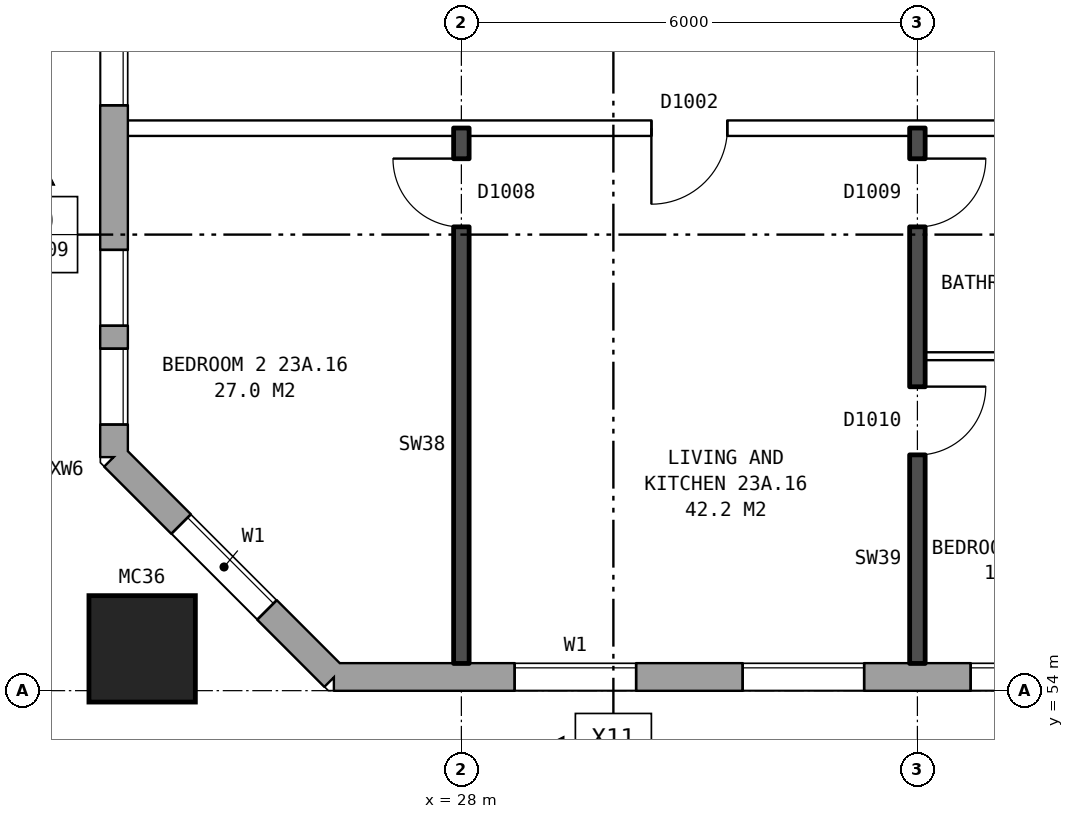
"""IFC4 building model, lengths in metres.
Left out: names, types, materials, properties, quantities, classifications, styles, units other than length and angle.
Written with IfcOpenShell. Run it as: python <this file> out.ifc"""

import sys

from ifc_helpers import new_model, si_unit, direction, frame, frame_2d, origin, origin_2d, place, context, subcontext, project, spatial, rectangle, hollow_rectangle, extrude, element, fill, save


model = new_model("IFC4")
c1 = context("Model", 3, precision=1e-05, world=origin(), true_north=direction((0.0, 1.0)))
c2 = subcontext(c1, "Body", "Model", "MODEL_VIEW")
j1 = project(units=[si_unit("LENGTHUNIT", "METRE"), si_unit("PLANEANGLEUNIT", "RADIAN")], contexts=[c1])
p1 = place(None, origin())
s1 = spatial("IfcSite", under=j1, at=p1, CompositionType="ELEMENT")
p2 = place(p1, origin())
s2 = spatial("IfcBuilding", under=s1, at=p2, CompositionType="ELEMENT")
p3 = place(p2, frame((0.0, 0.0, 84.0)))
s3 = spatial("IfcBuildingStorey", under=s2, at=p3, CompositionType="ELEMENT", Elevation=84.0)
p4 = place(p3, frame((23.8, 54.55, 0.0), z_axis=(0.0, 0.0, 1.0), x_axis=(1.0, 0.0, 0.0)))
e1 = element("IfcColumn", 1, at=p4, inside=s3, PredefinedType="COLUMN", context=c2, shape_type="SweptSolid", body=[
    extrude(hollow_rectangle(XDim=1.4, YDim=1.4, WallThickness=0.075, at=origin_2d()), origin(), (0.0, 0.0, 1.0), 3.1),
])
p5 = place(p3, frame((23.43, 57.075, 0.0), z_axis=(0.0, 0.0, 1.0), x_axis=(0.707106781187, -0.707106781187, 0.0)))
e2 = element("IfcWall", 2, at=p5, inside=s3, PredefinedType="STANDARD", context=c2, shape_type="SweptSolid", body=[
    extrude(rectangle(XDim=4.094, YDim=0.36, at=frame_2d((2.047, 0.0))), origin(), (0.0, 0.0, 1.0), 2.85),
])
p6 = place(p5, frame((1.247, 0.0, 0.8)))
e3 = element("IfcOpeningElement", 3, at=p6, cuts=e2, PredefinedType="OPENING", context=c2, shape_type="SweptSolid", body=[
    extrude(rectangle(XDim=1.6, YDim=1.8, at=frame_2d((0.8, 0.9))), frame((0.0, 0.19, 0.0), z_axis=(0.0, -1.0, 0.0), x_axis=(1.0, 0.0, 0.0)), (0.0, 0.0, 1.0), 0.38),
])
p7 = place(p3, frame((26.325, 54.18, 0.0), z_axis=(0.0, 0.0, 1.0), x_axis=(1.0, 0.0, 0.0)))
e4 = element("IfcWall", 4, at=p7, inside=s3, PredefinedType="STANDARD", context=c2, shape_type="SweptSolid", body=[
    extrude(rectangle(XDim=46.601, YDim=0.36, at=frame_2d((23.3, 0.0))), origin(), (0.0, 0.0, 1.0), 2.85),
])
p8 = place(p7, frame((2.375, 0.0, 0.8)))
e5 = element("IfcOpeningElement", 5, at=p8, cuts=e4, PredefinedType="OPENING", context=c2, shape_type="SweptSolid", body=[
    extrude(rectangle(XDim=1.6, YDim=1.8, at=frame_2d((0.8, 0.9))), frame((0.0, 0.19, 0.0), z_axis=(0.0, -1.0, 0.0), x_axis=(1.0, 0.0, 0.0)), (0.0, 0.0, 1.0), 0.38),
])
p9 = place(p7, frame((5.375, 0.0, 0.8)))
e6 = element("IfcOpeningElement", 6, at=p9, cuts=e4, PredefinedType="OPENING", context=c2, shape_type="SweptSolid", body=[
    extrude(rectangle(XDim=1.6, YDim=1.8, at=frame_2d((0.8, 0.9))), frame((0.0, 0.19, 0.0), z_axis=(0.0, -1.0, 0.0), x_axis=(1.0, 0.0, 0.0)), (0.0, 0.0, 1.0), 0.38),
])
p10 = place(p7, frame((8.375, 0.0, 0.8)))
e7 = element("IfcOpeningElement", 7, at=p10, cuts=e4, PredefinedType="OPENING", context=c2, shape_type="SweptSolid", body=[
    extrude(rectangle(XDim=1.6, YDim=1.8, at=frame_2d((0.8, 0.9))), frame((0.0, 0.19, 0.0), z_axis=(0.0, -1.0, 0.0), x_axis=(1.0, 0.0, 0.0)), (0.0, 0.0, 1.0), 0.38),
])
p11 = place(p7, frame((11.375, 0.0, 0.8)))
e8 = element("IfcOpeningElement", 8, at=p11, cuts=e4, PredefinedType="OPENING", context=c2, shape_type="SweptSolid", body=[
    extrude(rectangle(XDim=1.6, YDim=1.8, at=frame_2d((0.8, 0.9))), frame((0.0, 0.19, 0.0), z_axis=(0.0, -1.0, 0.0), x_axis=(1.0, 0.0, 0.0)), (0.0, 0.0, 1.0), 0.38),
])
p12 = place(p7, frame((14.375, 0.0, 0.8)))
e9 = element("IfcOpeningElement", 9, at=p12, cuts=e4, PredefinedType="OPENING", context=c2, shape_type="SweptSolid", body=[
    extrude(rectangle(XDim=1.6, YDim=1.8, at=frame_2d((0.8, 0.9))), frame((0.0, 0.19, 0.0), z_axis=(0.0, -1.0, 0.0), x_axis=(1.0, 0.0, 0.0)), (0.0, 0.0, 1.0), 0.38),
])
p13 = place(p7, frame((16.275, 0.0, 1.4)))
e10 = element("IfcOpeningElement", 10, at=p13, cuts=e4, PredefinedType="OPENING", context=c2, shape_type="SweptSolid", body=[
    extrude(rectangle(XDim=1.2, YDim=1.2, at=frame_2d((0.6, 0.6))), frame((0.0, 0.19, 0.0), z_axis=(0.0, -1.0, 0.0), x_axis=(1.0, 0.0, 0.0)), (0.0, 0.0, 1.0), 0.38),
])
p14 = place(p7, frame((20.375, 0.0, 0.8)))
e11 = element("IfcOpeningElement", 11, at=p14, cuts=e4, PredefinedType="OPENING", context=c2, shape_type="SweptSolid", body=[
    extrude(rectangle(XDim=1.6, YDim=1.8, at=frame_2d((0.8, 0.9))), frame((0.0, 0.19, 0.0), z_axis=(0.0, -1.0, 0.0), x_axis=(1.0, 0.0, 0.0)), (0.0, 0.0, 1.0), 0.38),
])
p15 = place(p7, frame((23.375, 0.0, 0.8)))
e12 = element("IfcOpeningElement", 12, at=p15, cuts=e4, PredefinedType="OPENING", context=c2, shape_type="SweptSolid", body=[
    extrude(rectangle(XDim=1.6, YDim=1.8, at=frame_2d((0.8, 0.9))), frame((0.0, 0.19, 0.0), z_axis=(0.0, -1.0, 0.0), x_axis=(1.0, 0.0, 0.0)), (0.0, 0.0, 1.0), 0.38),
])
p16 = place(p7, frame((25.875, 0.0, 0.15)))
e13 = element("IfcOpeningElement", 13, at=p16, cuts=e4, PredefinedType="OPENING", context=c2, shape_type="SweptSolid", body=[
    extrude(rectangle(XDim=1.2, YDim=1.8, at=frame_2d((0.6, 0.9))), frame((0.0, 0.19, 0.0), z_axis=(0.0, -1.0, 0.0), x_axis=(1.0, 0.0, 0.0)), (0.0, 0.0, 1.0), 0.38),
])
p17 = place(p7, frame((28.825, 0.0, 1.7)))
e14 = element("IfcOpeningElement", 14, at=p17, cuts=e4, PredefinedType="OPENING", context=c2, shape_type="SweptSolid", body=[
    extrude(rectangle(XDim=0.6, YDim=0.9, at=frame_2d((0.3, 0.45))), frame((0.0, 0.19, 0.0), z_axis=(0.0, -1.0, 0.0), x_axis=(1.0, 0.0, 0.0)), (0.0, 0.0, 1.0), 0.38),
])
p18 = place(p7, frame((32.375, 0.0, 0.8)))
e15 = element("IfcOpeningElement", 15, at=p18, cuts=e4, PredefinedType="OPENING", context=c2, shape_type="SweptSolid", body=[
    extrude(rectangle(XDim=1.6, YDim=1.8, at=frame_2d((0.8, 0.9))), frame((0.0, 0.19, 0.0), z_axis=(0.0, -1.0, 0.0), x_axis=(1.0, 0.0, 0.0)), (0.0, 0.0, 1.0), 0.38),
])
p19 = place(p7, frame((35.375, 0.0, 0.8)))
e16 = element("IfcOpeningElement", 16, at=p19, cuts=e4, PredefinedType="OPENING", context=c2, shape_type="SweptSolid", body=[
    extrude(rectangle(XDim=1.6, YDim=1.8, at=frame_2d((0.8, 0.9))), frame((0.0, 0.19, 0.0), z_axis=(0.0, -1.0, 0.0), x_axis=(1.0, 0.0, 0.0)), (0.0, 0.0, 1.0), 0.38),
])
p20 = place(p7, frame((38.375, 0.0, 0.8)))
e17 = element("IfcOpeningElement", 17, at=p20, cuts=e4, PredefinedType="OPENING", context=c2, shape_type="SweptSolid", body=[
    extrude(rectangle(XDim=1.6, YDim=1.8, at=frame_2d((0.8, 0.9))), frame((0.0, 0.19, 0.0), z_axis=(0.0, -1.0, 0.0), x_axis=(1.0, 0.0, 0.0)), (0.0, 0.0, 1.0), 0.38),
])
p21 = place(p7, frame((41.375, 0.0, 0.8)))
e18 = element("IfcOpeningElement", 18, at=p21, cuts=e4, PredefinedType="OPENING", context=c2, shape_type="SweptSolid", body=[
    extrude(rectangle(XDim=1.6, YDim=1.8, at=frame_2d((0.8, 0.9))), frame((0.0, 0.19, 0.0), z_axis=(0.0, -1.0, 0.0), x_axis=(1.0, 0.0, 0.0)), (0.0, 0.0, 1.0), 0.38),
])
p22 = place(p7, frame((44.375, 0.0, 0.8)))
e19 = element("IfcOpeningElement", 19, at=p22, cuts=e4, PredefinedType="OPENING", context=c2, shape_type="SweptSolid", body=[
    extrude(rectangle(XDim=1.6, YDim=1.8, at=frame_2d((0.8, 0.9))), frame((0.0, 0.19, 0.0), z_axis=(0.0, -1.0, 0.0), x_axis=(1.0, 0.0, 0.0)), (0.0, 0.0, 1.0), 0.38),
])
p23 = place(p7, frame((27.375, 0.0, 0.15)))
e20 = element("IfcOpeningElement", 20, at=p23, cuts=e4, PredefinedType="OPENING", context=c2, shape_type="SweptSolid", body=[
    extrude(rectangle(XDim=0.8, YDim=0.9, at=frame_2d((0.4, 0.45))), frame((0.0, 0.19, 0.0), z_axis=(0.0, -1.0, 0.0), x_axis=(1.0, 0.0, 0.0)), (0.0, 0.0, 1.0), 0.38),
])
p24 = place(p7, frame((29.775, 0.0, 0.8)))
e21 = element("IfcOpeningElement", 21, at=p24, cuts=e4, PredefinedType="OPENING", context=c2, shape_type="SweptSolid", body=[
    extrude(rectangle(XDim=1.6, YDim=1.8, at=frame_2d((0.8, 0.9))), frame((0.0, 0.19, 0.0), z_axis=(0.0, -1.0, 0.0), x_axis=(1.0, 0.0, 0.0)), (0.0, 0.0, 1.0), 0.38),
])
p25 = place(p3, frame((23.43, 82.925, 0.0), z_axis=(0.0, 0.0, 1.0), x_axis=(0.0, -1.0, 0.0)))
e22 = element("IfcWall", 22, at=p25, inside=s3, PredefinedType="STANDARD", context=c2, shape_type="SweptSolid", body=[
    extrude(rectangle(XDim=25.851, YDim=0.36, at=frame_2d((12.925, 0.0))), origin(), (0.0, 0.0, 1.0), 2.85),
])
p26 = place(p25, frame((0.3, 0.0, 0.8)))
e23 = element("IfcOpeningElement", 23, at=p26, cuts=e22, PredefinedType="OPENING", context=c2, shape_type="SweptSolid", body=[
    extrude(rectangle(XDim=1.0, YDim=1.8, at=frame_2d((0.5, 0.9))), frame((0.0, 0.19, 0.0), z_axis=(0.0, -1.0, 0.0), x_axis=(1.0, 0.0, 0.0)), (0.0, 0.0, 1.0), 0.38),
])
p27 = place(p25, frame((4.625, 0.0, 0.8)))
e24 = element("IfcOpeningElement", 24, at=p27, cuts=e22, PredefinedType="OPENING", context=c2, shape_type="SweptSolid", body=[
    extrude(rectangle(XDim=1.6, YDim=1.8, at=frame_2d((0.8, 0.9))), frame((0.0, 0.19, 0.0), z_axis=(0.0, -1.0, 0.0), x_axis=(1.0, 0.0, 0.0)), (0.0, 0.0, 1.0), 0.38),
])
p28 = place(p25, frame((7.625, 0.0, 0.8)))
e25 = element("IfcOpeningElement", 25, at=p28, cuts=e22, PredefinedType="OPENING", context=c2, shape_type="SweptSolid", body=[
    extrude(rectangle(XDim=1.6, YDim=1.8, at=frame_2d((0.8, 0.9))), frame((0.0, 0.19, 0.0), z_axis=(0.0, -1.0, 0.0), x_axis=(1.0, 0.0, 0.0)), (0.0, 0.0, 1.0), 0.38),
])
p29 = place(p25, frame((10.625, 0.0, 0.8)))
e26 = element("IfcOpeningElement", 26, at=p29, cuts=e22, PredefinedType="OPENING", context=c2, shape_type="SweptSolid", body=[
    extrude(rectangle(XDim=1.6, YDim=1.8, at=frame_2d((0.8, 0.9))), frame((0.0, 0.19, 0.0), z_axis=(0.0, -1.0, 0.0), x_axis=(1.0, 0.0, 0.0)), (0.0, 0.0, 1.0), 0.38),
])
p30 = place(p25, frame((13.625, 0.0, 0.8)))
e27 = element("IfcOpeningElement", 27, at=p30, cuts=e22, PredefinedType="OPENING", context=c2, shape_type="SweptSolid", body=[
    extrude(rectangle(XDim=1.6, YDim=1.8, at=frame_2d((0.8, 0.9))), frame((0.0, 0.19, 0.0), z_axis=(0.0, -1.0, 0.0), x_axis=(1.0, 0.0, 0.0)), (0.0, 0.0, 1.0), 0.38),
])
p31 = place(p25, frame((16.625, 0.0, 0.8)))
e28 = element("IfcOpeningElement", 28, at=p31, cuts=e22, PredefinedType="OPENING", context=c2, shape_type="SweptSolid", body=[
    extrude(rectangle(XDim=1.6, YDim=1.8, at=frame_2d((0.8, 0.9))), frame((0.0, 0.19, 0.0), z_axis=(0.0, -1.0, 0.0), x_axis=(1.0, 0.0, 0.0)), (0.0, 0.0, 1.0), 0.38),
])
p32 = place(p25, frame((19.625, 0.0, 0.8)))
e29 = element("IfcOpeningElement", 29, at=p32, cuts=e22, PredefinedType="OPENING", context=c2, shape_type="SweptSolid", body=[
    extrude(rectangle(XDim=1.6, YDim=1.8, at=frame_2d((0.8, 0.9))), frame((0.0, 0.19, 0.0), z_axis=(0.0, -1.0, 0.0), x_axis=(1.0, 0.0, 0.0)), (0.0, 0.0, 1.0), 0.38),
])
p33 = place(p25, frame((23.125, 0.0, 0.8)))
e30 = element("IfcOpeningElement", 30, at=p33, cuts=e22, PredefinedType="OPENING", context=c2, shape_type="SweptSolid", body=[
    extrude(rectangle(XDim=1.0, YDim=0.9, at=frame_2d((0.5, 0.45))), frame((0.0, 0.19, 0.0), z_axis=(0.0, -1.0, 0.0), x_axis=(1.0, 0.0, 0.0)), (0.0, 0.0, 1.0), 0.38),
])
p34 = place(p25, frame((1.6, 0.0, 0.8)))
e31 = element("IfcOpeningElement", 31, at=p34, cuts=e22, PredefinedType="OPENING", context=c2, shape_type="SweptSolid", body=[
    extrude(rectangle(XDim=1.0, YDim=0.9, at=frame_2d((0.5, 0.45))), frame((0.0, 0.19, 0.0), z_axis=(0.0, -1.0, 0.0), x_axis=(1.0, 0.0, 0.0)), (0.0, 0.0, 1.0), 0.38),
])
p35 = place(p25, frame((24.425, 0.0, 0.8)))
e32 = element("IfcOpeningElement", 32, at=p35, cuts=e22, PredefinedType="OPENING", context=c2, shape_type="SweptSolid", body=[
    extrude(rectangle(XDim=1.0, YDim=1.8, at=frame_2d((0.5, 0.9))), frame((0.0, 0.19, 0.0), z_axis=(0.0, -1.0, 0.0), x_axis=(1.0, 0.0, 0.0)), (0.0, 0.0, 1.0), 0.38),
])
p36 = place(p3, frame((34.1, 58.4, 0.0), z_axis=(0.0, 0.0, 1.0), x_axis=(1.0, 0.0, 0.0)))
e33 = element("IfcWall", 33, at=p36, inside=s3, PredefinedType="PARTITIONING", context=c2, shape_type="SweptSolid", body=[
    extrude(rectangle(XDim=2.8, YDim=0.1, at=frame_2d((1.4, 0.0))), origin(), (0.0, 0.0, 1.0), 2.85),
])
p37 = place(p3, frame((23.61, 61.4, 0.0), z_axis=(0.0, 0.0, 1.0), x_axis=(1.0, 0.0, 0.0)))
e34 = element("IfcWall", 34, at=p37, inside=s3, PredefinedType="PARTITIONING", context=c2, shape_type="SweptSolid", body=[
    extrude(rectangle(XDim=22.29, YDim=0.2, at=frame_2d((11.145, 0.0))), origin(), (0.0, 0.0, 1.0), 2.85),
])
p38 = place(p37, frame((18.84, 0.0, 0.0)))
e35 = element("IfcOpeningElement", 35, at=p38, cuts=e34, PredefinedType="OPENING", context=c2, shape_type="SweptSolid", body=[
    extrude(rectangle(XDim=1.0, YDim=2.1, at=frame_2d((0.5, 1.05))), frame((0.0, 0.11, 0.0), z_axis=(0.0, -1.0, 0.0), x_axis=(1.0, 0.0, 0.0)), (0.0, 0.0, 1.0), 0.22),
])
p39 = place(p37, frame((6.89, 0.0, 0.0)))
e36 = element("IfcOpeningElement", 36, at=p39, cuts=e34, PredefinedType="OPENING", context=c2, shape_type="SweptSolid", body=[
    extrude(rectangle(XDim=1.0, YDim=2.1, at=frame_2d((0.5, 1.05))), frame((0.0, 0.11, 0.0), z_axis=(0.0, -1.0, 0.0), x_axis=(1.0, 0.0, 0.0)), (0.0, 0.0, 1.0), 0.22),
])
p40 = place(p3, frame((28.0, 54.36, 0.0), z_axis=(0.0, 0.0, 1.0), x_axis=(0.0, 1.0, 0.0)))
e37 = element("IfcWall", 37, at=p40, inside=s3, PredefinedType="SOLIDWALL", context=c2, shape_type="SweptSolid", body=[
    extrude(rectangle(XDim=7.04, YDim=0.2, at=frame_2d((3.52, 0.0))), origin(), (0.0, 0.0, 1.0), 2.85),
])
p41 = place(p40, frame((5.74, 0.0, 0.0)))
e38 = element("IfcOpeningElement", 38, at=p41, cuts=e37, PredefinedType="OPENING", context=c2, shape_type="SweptSolid", body=[
    extrude(rectangle(XDim=0.9, YDim=2.1, at=frame_2d((0.45, 1.05))), frame((0.0, 0.11, 0.0), z_axis=(0.0, -1.0, 0.0), x_axis=(1.0, 0.0, 0.0)), (0.0, 0.0, 1.0), 0.22),
])
p42 = place(p3, frame((34.0, 54.36, 0.0), z_axis=(0.0, 0.0, 1.0), x_axis=(0.0, 1.0, 0.0)))
e39 = element("IfcWall", 39, at=p42, inside=s3, PredefinedType="SOLIDWALL", context=c2, shape_type="SweptSolid", body=[
    extrude(rectangle(XDim=7.04, YDim=0.2, at=frame_2d((3.52, 0.0))), origin(), (0.0, 0.0, 1.0), 2.85),
])
p43 = place(p42, frame((2.74, 0.0, 0.0)))
e40 = element("IfcOpeningElement", 40, at=p43, cuts=e39, PredefinedType="OPENING", context=c2, shape_type="SweptSolid", body=[
    extrude(rectangle(XDim=0.9, YDim=2.1, at=frame_2d((0.45, 1.05))), frame((0.0, 0.11, 0.0), z_axis=(0.0, -1.0, 0.0), x_axis=(1.0, 0.0, 0.0)), (0.0, 0.0, 1.0), 0.22),
])
p44 = place(p42, frame((5.74, 0.0, 0.0)))
e41 = element("IfcOpeningElement", 41, at=p44, cuts=e39, PredefinedType="OPENING", context=c2, shape_type="SweptSolid", body=[
    extrude(rectangle(XDim=0.9, YDim=2.1, at=frame_2d((0.45, 1.05))), frame((0.0, 0.11, 0.0), z_axis=(0.0, -1.0, 0.0), x_axis=(1.0, 0.0, 0.0)), (0.0, 0.0, 1.0), 0.22),
])
p45 = place(p6, origin())
e42 = element("IfcWindow", 42, at=p45, inside=s3, PartitioningType="SINGLE_PANEL", PredefinedType="WINDOW", context=c2, shape_type="SweptSolid", body=[
    extrude(rectangle(XDim=1.6, YDim=1.8, at=frame_2d((0.8, 0.9))), frame((0.0, 0.15, 0.0), z_axis=(0.0, -1.0, 0.0), x_axis=(1.0, 0.0, 0.0)), (0.0, 0.0, 1.0), 0.06),
])
fill(e3, e42)
p46 = place(p8, origin())
e43 = element("IfcWindow", 43, at=p46, inside=s3, PartitioningType="SINGLE_PANEL", PredefinedType="WINDOW", context=c2, shape_type="SweptSolid", body=[
    extrude(rectangle(XDim=1.6, YDim=1.8, at=frame_2d((0.8, 0.9))), frame((0.0, 0.15, 0.0), z_axis=(0.0, -1.0, 0.0), x_axis=(1.0, 0.0, 0.0)), (0.0, 0.0, 1.0), 0.06),
])
fill(e5, e43)
p47 = place(p9, origin())
e44 = element("IfcWindow", 44, at=p47, inside=s3, PartitioningType="SINGLE_PANEL", PredefinedType="WINDOW", context=c2, shape_type="SweptSolid", body=[
    extrude(rectangle(XDim=1.6, YDim=1.8, at=frame_2d((0.8, 0.9))), frame((0.0, 0.15, 0.0), z_axis=(0.0, -1.0, 0.0), x_axis=(1.0, 0.0, 0.0)), (0.0, 0.0, 1.0), 0.06),
])
fill(e6, e44)
p48 = place(p10, origin())
e45 = element("IfcWindow", 45, at=p48, inside=s3, PartitioningType="SINGLE_PANEL", PredefinedType="WINDOW", context=c2, shape_type="SweptSolid", body=[
    extrude(rectangle(XDim=1.6, YDim=1.8, at=frame_2d((0.8, 0.9))), frame((0.0, 0.15, 0.0), z_axis=(0.0, -1.0, 0.0), x_axis=(1.0, 0.0, 0.0)), (0.0, 0.0, 1.0), 0.06),
])
fill(e7, e45)
p49 = place(p32, origin())
e46 = element("IfcWindow", 46, at=p49, inside=s3, PartitioningType="SINGLE_PANEL", PredefinedType="WINDOW", context=c2, shape_type="SweptSolid", body=[
    extrude(rectangle(XDim=1.6, YDim=1.8, at=frame_2d((0.8, 0.9))), frame((0.0, 0.15, 0.0), z_axis=(0.0, -1.0, 0.0), x_axis=(1.0, 0.0, 0.0)), (0.0, 0.0, 1.0), 0.06),
])
fill(e29, e46)
p50 = place(p33, origin())
e47 = element("IfcWindow", 47, at=p50, inside=s3, PartitioningType="SINGLE_PANEL", PredefinedType="WINDOW", context=c2, shape_type="SweptSolid", body=[
    extrude(rectangle(XDim=1.0, YDim=0.9, at=frame_2d((0.5, 0.45))), frame((0.0, 0.15, 0.0), z_axis=(0.0, -1.0, 0.0), x_axis=(1.0, 0.0, 0.0)), (0.0, 0.0, 1.0), 0.06),
])
fill(e30, e47)
p51 = place(p43, frame((0.9, 0.0, 0.0), z_axis=(0.0, 0.0, 1.0), x_axis=(-1.0, 0.0, 0.0)))
e48 = element("IfcDoor", 48, at=p51, inside=s3, OperationType="SINGLE_SWING_LEFT", PredefinedType="DOOR", context=c2, shape_type="SweptSolid", body=[
    extrude(rectangle(XDim=0.9, YDim=2.1, at=frame_2d((0.45, 1.05))), frame((0.0, 0.025, 0.0), z_axis=(0.0, -1.0, 0.0), x_axis=(1.0, 0.0, 0.0)), (0.0, 0.0, 1.0), 0.05),
])
fill(e40, e48)
p52 = place(p41, origin())
e49 = element("IfcDoor", 49, at=p52, inside=s3, OperationType="SINGLE_SWING_RIGHT", PredefinedType="DOOR", context=c2, shape_type="SweptSolid", body=[
    extrude(rectangle(XDim=0.9, YDim=2.1, at=frame_2d((0.45, 1.05))), frame((0.0, 0.025, 0.0), z_axis=(0.0, -1.0, 0.0), x_axis=(1.0, 0.0, 0.0)), (0.0, 0.0, 1.0), 0.05),
])
fill(e38, e49)
p53 = place(p39, frame((1.0, 0.0, 0.0), z_axis=(0.0, 0.0, 1.0), x_axis=(-1.0, 0.0, 0.0)))
e50 = element("IfcDoor", 50, at=p53, inside=s3, OperationType="SINGLE_SWING_RIGHT", PredefinedType="DOOR", context=c2, shape_type="SweptSolid", body=[
    extrude(rectangle(XDim=1.0, YDim=2.1, at=frame_2d((0.5, 1.05))), frame((0.0, 0.025, 0.0), z_axis=(0.0, -1.0, 0.0), x_axis=(1.0, 0.0, 0.0)), (0.0, 0.0, 1.0), 0.05),
])
fill(e36, e50)
p54 = place(p44, frame((0.9, 0.0, 0.0), z_axis=(0.0, 0.0, 1.0), x_axis=(-1.0, 0.0, 0.0)))
e51 = element("IfcDoor", 51, at=p54, inside=s3, OperationType="SINGLE_SWING_LEFT", PredefinedType="DOOR", context=c2, shape_type="SweptSolid", body=[
    extrude(rectangle(XDim=0.9, YDim=2.1, at=frame_2d((0.45, 1.05))), frame((0.0, 0.025, 0.0), z_axis=(0.0, -1.0, 0.0), x_axis=(1.0, 0.0, 0.0)), (0.0, 0.0, 1.0), 0.05),
])
fill(e41, e51)
p55 = place(p35, origin())
e52 = element("IfcWindow", 52, at=p55, inside=s3, PartitioningType="SINGLE_PANEL", PredefinedType="WINDOW", context=c2, shape_type="SweptSolid", body=[
    extrude(rectangle(XDim=1.0, YDim=1.8, at=frame_2d((0.5, 0.9))), frame((0.0, 0.15, 0.0), z_axis=(0.0, -1.0, 0.0), x_axis=(1.0, 0.0, 0.0)), (0.0, 0.0, 1.0), 0.06),
])
fill(e32, e52)
save(model, sys.argv[1])
